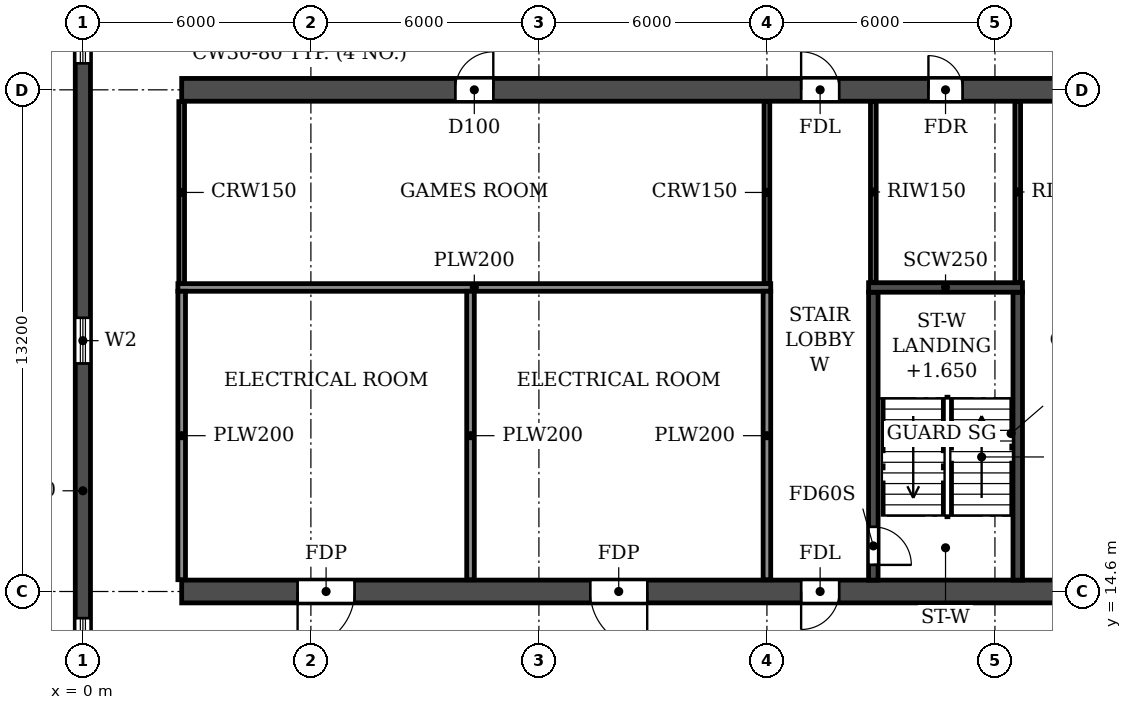
"""IFC4 building model, lengths in metres.
Left out: names, types, materials, properties, quantities, classifications, styles, units other than length and angle.
Written with IfcOpenShell. Run it as: python <this file> out.ifc"""

import sys

from ifc_helpers import new_model, si_unit, direction, frame, frame_2d, origin, place, context, subcontext, project, spatial, rectangle, extrude, element, fill, save


model = new_model("IFC4")
c1 = context("Model", 3, precision=1e-05, world=origin(), true_north=direction((0.0, 1.0)))
c2 = subcontext(c1, "Body", "Model", "MODEL_VIEW")
j1 = project(units=[si_unit("LENGTHUNIT", "METRE"), si_unit("PLANEANGLEUNIT", "RADIAN")], contexts=[c1])
p1 = place(None, origin())
s1 = spatial("IfcSite", under=j1, at=p1, CompositionType="ELEMENT")
p2 = place(p1, origin())
s2 = spatial("IfcBuilding", under=s1, at=p2, CompositionType="ELEMENT")
p3 = place(p2, frame((0.0, 0.0, 43.2)))
s3 = spatial("IfcBuildingStorey", under=s2, at=p3, CompositionType="ELEMENT", Elevation=43.2)
p4 = place(p3, frame((0.0, 4.683, 0.0), z_axis=(0.0, 0.0, 1.0), x_axis=(0.0, 1.0, 0.0)))
e1 = element("IfcWall", 1, at=p4, inside=s3, PredefinedType="SHEAR", context=c2, shape_type="SweptSolid", body=[
    extrude(rectangle(XDim=35.434, YDim=0.4, at=frame_2d((17.717, 0.0))), origin(), (0.0, 0.0, 1.0), 3.05),
])
p5 = place(p4, frame((23.817, 0.0, 0.9)))
e2 = element("IfcOpeningElement", 2, at=p5, cuts=e1, PredefinedType="OPENING", context=c2, shape_type="SweptSolid", body=[
    extrude(rectangle(XDim=1.2, YDim=1.5, at=frame_2d((0.6, 0.75))), frame((0.0, 0.21, 0.0), z_axis=(0.0, -1.0, 0.0), x_axis=(1.0, 0.0, 0.0)), (0.0, 0.0, 1.0), 0.42),
])
p6 = place(p4, frame((8.017, 0.0, 0.9)))
e3 = element("IfcOpeningElement", 3, at=p6, cuts=e1, PredefinedType="OPENING", context=c2, shape_type="SweptSolid", body=[
    extrude(rectangle(XDim=1.2, YDim=1.5, at=frame_2d((0.6, 0.75))), frame((0.0, 0.21, 0.0), z_axis=(0.0, -1.0, 0.0), x_axis=(1.0, 0.0, 0.0)), (0.0, 0.0, 1.0), 0.42),
])
p7 = place(p4, frame((15.917, 0.0, 0.9)))
e4 = element("IfcOpeningElement", 4, at=p7, cuts=e1, PredefinedType="OPENING", context=c2, shape_type="SweptSolid", body=[
    extrude(rectangle(XDim=1.2, YDim=1.5, at=frame_2d((0.6, 0.75))), frame((0.0, 0.21, 0.0), z_axis=(0.0, -1.0, 0.0), x_axis=(1.0, 0.0, 0.0)), (0.0, 0.0, 1.0), 0.42),
])
p8 = place(p4, frame((29.493, 0.0, 0.6)))
e5 = element("IfcOpeningElement", 5, at=p8, cuts=e1, PredefinedType="OPENING", context=c2, shape_type="SweptSolid", body=[
    extrude(rectangle(XDim=2.2, YDim=1.8, at=frame_2d((1.1, 0.9))), frame((0.0, 0.21, 0.0), z_axis=(0.0, -1.0, 0.0), x_axis=(1.0, 0.0, 0.0)), (0.0, 0.0, 1.0), 0.42),
])
p9 = place(p4, frame((2.541, 0.0, 0.6)))
e6 = element("IfcOpeningElement", 6, at=p9, cuts=e1, PredefinedType="OPENING", context=c2, shape_type="SweptSolid", body=[
    extrude(rectangle(XDim=2.2, YDim=1.8, at=frame_2d((1.1, 0.9))), frame((0.0, 0.21, 0.0), z_axis=(0.0, -1.0, 0.0), x_axis=(1.0, 0.0, 0.0)), (0.0, 0.0, 1.0), 0.42),
])
p10 = place(p3, frame((2.6, 14.6, 0.0), z_axis=(0.0, 0.0, 1.0), x_axis=(1.0, 0.0, 0.0)))
e7 = element("IfcWall", 7, at=p10, inside=s3, PredefinedType="SOLIDWALL", context=c2, shape_type="SweptSolid", body=[
    extrude(rectangle(XDim=96.8, YDim=0.6, at=frame_2d((48.4, 0.0))), origin(), (0.0, 0.0, 1.0), 3.05),
])
p11 = place(p10, frame((3.05, 0.0, 0.0)))
e8 = element("IfcOpeningElement", 8, at=p11, cuts=e7, PredefinedType="OPENING", context=c2, shape_type="SweptSolid", body=[
    extrude(rectangle(XDim=1.5, YDim=2.1, at=frame_2d((0.75, 1.05))), frame((0.0, 0.31, 0.0), z_axis=(0.0, -1.0, 0.0), x_axis=(1.0, 0.0, 0.0)), (0.0, 0.0, 1.0), 0.62),
])
p12 = place(p10, frame((10.75, 0.0, 0.0)))
e9 = element("IfcOpeningElement", 9, at=p12, cuts=e7, PredefinedType="OPENING", context=c2, shape_type="SweptSolid", body=[
    extrude(rectangle(XDim=1.5, YDim=2.1, at=frame_2d((0.75, 1.05))), frame((0.0, 0.31, 0.0), z_axis=(0.0, -1.0, 0.0), x_axis=(1.0, 0.0, 0.0)), (0.0, 0.0, 1.0), 0.62),
])
p13 = place(p10, frame((16.3, 0.0, 0.0)))
e10 = element("IfcOpeningElement", 10, at=p13, cuts=e7, PredefinedType="OPENING", context=c2, shape_type="SweptSolid", body=[
    extrude(rectangle(XDim=1.0, YDim=2.1, at=frame_2d((0.5, 1.05))), frame((0.0, 0.31, 0.0), z_axis=(0.0, -1.0, 0.0), x_axis=(1.0, 0.0, 0.0)), (0.0, 0.0, 1.0), 0.62),
])
p14 = place(p10, frame((24.2, 0.0, 0.0)))
e11 = element("IfcOpeningElement", 11, at=p14, cuts=e7, PredefinedType="OPENING", context=c2, shape_type="SweptSolid", body=[
    extrude(rectangle(XDim=1.0, YDim=2.1, at=frame_2d((0.5, 1.05))), frame((0.0, 0.31, 0.0), z_axis=(0.0, -1.0, 0.0), x_axis=(1.0, 0.0, 0.0)), (0.0, 0.0, 1.0), 0.62),
])
p15 = place(p10, frame((28.8, 0.0, 0.0)))
e12 = element("IfcOpeningElement", 12, at=p15, cuts=e7, PredefinedType="OPENING", context=c2, shape_type="SweptSolid", body=[
    extrude(rectangle(XDim=1.0, YDim=2.1, at=frame_2d((0.5, 1.05))), frame((0.0, 0.31, 0.0), z_axis=(0.0, -1.0, 0.0), x_axis=(1.0, 0.0, 0.0)), (0.0, 0.0, 1.0), 0.62),
])
p16 = place(p10, frame((42.7, 0.0, 0.0)))
e13 = element("IfcOpeningElement", 13, at=p16, cuts=e7, PredefinedType="OPENING", context=c2, shape_type="SweptSolid", body=[
    extrude(rectangle(XDim=1.0, YDim=2.1, at=frame_2d((0.5, 1.05))), frame((0.0, 0.31, 0.0), z_axis=(0.0, -1.0, 0.0), x_axis=(1.0, 0.0, 0.0)), (0.0, 0.0, 1.0), 0.62),
])
p17 = place(p10, frame((47.9, 0.0, 0.0)))
e14 = element("IfcOpeningElement", 14, at=p17, cuts=e7, PredefinedType="OPENING", context=c2, shape_type="SweptSolid", body=[
    extrude(rectangle(XDim=1.0, YDim=2.1, at=frame_2d((0.5, 1.05))), frame((0.0, 0.31, 0.0), z_axis=(0.0, -1.0, 0.0), x_axis=(1.0, 0.0, 0.0)), (0.0, 0.0, 1.0), 0.62),
])
p18 = place(p10, frame((51.8, 0.0, 0.0)))
e15 = element("IfcOpeningElement", 15, at=p18, cuts=e7, PredefinedType="OPENING", context=c2, shape_type="SweptSolid", body=[
    extrude(rectangle(XDim=1.0, YDim=2.1, at=frame_2d((0.5, 1.05))), frame((0.0, 0.31, 0.0), z_axis=(0.0, -1.0, 0.0), x_axis=(1.0, 0.0, 0.0)), (0.0, 0.0, 1.0), 0.62),
])
p19 = place(p10, frame((55.7, 0.0, 0.0)))
e16 = element("IfcOpeningElement", 16, at=p19, cuts=e7, PredefinedType="OPENING", context=c2, shape_type="SweptSolid", body=[
    extrude(rectangle(XDim=1.0, YDim=2.1, at=frame_2d((0.5, 1.05))), frame((0.0, 0.31, 0.0), z_axis=(0.0, -1.0, 0.0), x_axis=(1.0, 0.0, 0.0)), (0.0, 0.0, 1.0), 0.62),
])
p20 = place(p10, frame((67.0, 0.0, 0.0)))
e17 = element("IfcOpeningElement", 17, at=p20, cuts=e7, PredefinedType="OPENING", context=c2, shape_type="SweptSolid", body=[
    extrude(rectangle(XDim=1.0, YDim=2.1, at=frame_2d((0.5, 1.05))), frame((0.0, 0.31, 0.0), z_axis=(0.0, -1.0, 0.0), x_axis=(1.0, 0.0, 0.0)), (0.0, 0.0, 1.0), 0.62),
])
p21 = place(p10, frame((71.6, 0.0, 0.0)))
e18 = element("IfcOpeningElement", 18, at=p21, cuts=e7, PredefinedType="OPENING", context=c2, shape_type="SweptSolid", body=[
    extrude(rectangle(XDim=1.0, YDim=2.1, at=frame_2d((0.5, 1.05))), frame((0.0, 0.31, 0.0), z_axis=(0.0, -1.0, 0.0), x_axis=(1.0, 0.0, 0.0)), (0.0, 0.0, 1.0), 0.62),
])
p22 = place(p10, frame((79.5, 0.0, 0.0)))
e19 = element("IfcOpeningElement", 19, at=p22, cuts=e7, PredefinedType="OPENING", context=c2, shape_type="SweptSolid", body=[
    extrude(rectangle(XDim=1.0, YDim=2.1, at=frame_2d((0.5, 1.05))), frame((0.0, 0.31, 0.0), z_axis=(0.0, -1.0, 0.0), x_axis=(1.0, 0.0, 0.0)), (0.0, 0.0, 1.0), 0.62),
])
p23 = place(p10, frame((84.05, 0.0, 0.0)))
e20 = element("IfcOpeningElement", 20, at=p23, cuts=e7, PredefinedType="OPENING", context=c2, shape_type="SweptSolid", body=[
    extrude(rectangle(XDim=1.0, YDim=2.1, at=frame_2d((0.5, 1.05))), frame((0.0, 0.31, 0.0), z_axis=(0.0, -1.0, 0.0), x_axis=(1.0, 0.0, 0.0)), (0.0, 0.0, 1.0), 0.62),
])
p24 = place(p10, frame((91.75, 0.0, 0.0)))
e21 = element("IfcOpeningElement", 21, at=p24, cuts=e7, PredefinedType="OPENING", context=c2, shape_type="SweptSolid", body=[
    extrude(rectangle(XDim=1.0, YDim=2.1, at=frame_2d((0.5, 1.05))), frame((0.0, 0.31, 0.0), z_axis=(0.0, -1.0, 0.0), x_axis=(1.0, 0.0, 0.0)), (0.0, 0.0, 1.0), 0.62),
])
p25 = place(p3, frame((2.6, 27.8, 0.0), z_axis=(0.0, 0.0, 1.0), x_axis=(1.0, 0.0, 0.0)))
e22 = element("IfcWall", 22, at=p25, inside=s3, PredefinedType="SOLIDWALL", context=c2, shape_type="SweptSolid", body=[
    extrude(rectangle(XDim=96.8, YDim=0.6, at=frame_2d((48.4, 0.0))), origin(), (0.0, 0.0, 1.0), 3.05),
])
p26 = place(p25, frame((7.2, 0.0, 0.0)))
e23 = element("IfcOpeningElement", 23, at=p26, cuts=e22, PredefinedType="OPENING", context=c2, shape_type="SweptSolid", body=[
    extrude(rectangle(XDim=1.0, YDim=2.1, at=frame_2d((0.5, 1.05))), frame((0.0, 0.31, 0.0), z_axis=(0.0, -1.0, 0.0), x_axis=(1.0, 0.0, 0.0)), (0.0, 0.0, 1.0), 0.62),
])
p27 = place(p25, frame((16.3, 0.0, 0.0)))
e24 = element("IfcOpeningElement", 24, at=p27, cuts=e22, PredefinedType="OPENING", context=c2, shape_type="SweptSolid", body=[
    extrude(rectangle(XDim=1.0, YDim=2.1, at=frame_2d((0.5, 1.05))), frame((0.0, 0.31, 0.0), z_axis=(0.0, -1.0, 0.0), x_axis=(1.0, 0.0, 0.0)), (0.0, 0.0, 1.0), 0.62),
])
p28 = place(p25, frame((19.65, 0.0, 0.0)))
e25 = element("IfcOpeningElement", 25, at=p28, cuts=e22, PredefinedType="OPENING", context=c2, shape_type="SweptSolid", body=[
    extrude(rectangle(XDim=0.9, YDim=2.1, at=frame_2d((0.45, 1.05))), frame((0.0, 0.31, 0.0), z_axis=(0.0, -1.0, 0.0), x_axis=(1.0, 0.0, 0.0)), (0.0, 0.0, 1.0), 0.62),
])
p29 = place(p25, frame((28.85, 0.0, 0.0)))
e26 = element("IfcOpeningElement", 26, at=p29, cuts=e22, PredefinedType="OPENING", context=c2, shape_type="SweptSolid", body=[
    extrude(rectangle(XDim=0.9, YDim=2.1, at=frame_2d((0.45, 1.05))), frame((0.0, 0.31, 0.0), z_axis=(0.0, -1.0, 0.0), x_axis=(1.0, 0.0, 0.0)), (0.0, 0.0, 1.0), 0.62),
])
p30 = place(p25, frame((33.3, 0.0, 0.0)))
e27 = element("IfcOpeningElement", 27, at=p30, cuts=e22, PredefinedType="OPENING", context=c2, shape_type="SweptSolid", body=[
    extrude(rectangle(XDim=1.0, YDim=2.1, at=frame_2d((0.5, 1.05))), frame((0.0, 0.31, 0.0), z_axis=(0.0, -1.0, 0.0), x_axis=(1.0, 0.0, 0.0)), (0.0, 0.0, 1.0), 0.62),
])
p31 = place(p25, frame((38.25, 0.0, 0.0)))
e28 = element("IfcOpeningElement", 28, at=p31, cuts=e22, PredefinedType="OPENING", context=c2, shape_type="SweptSolid", body=[
    extrude(rectangle(XDim=1.5, YDim=2.1, at=frame_2d((0.75, 1.05))), frame((0.0, 0.31, 0.0), z_axis=(0.0, -1.0, 0.0), x_axis=(1.0, 0.0, 0.0)), (0.0, 0.0, 1.0), 0.62),
])
p32 = place(p25, frame((45.0, 0.0, 0.0)))
e29 = element("IfcOpeningElement", 29, at=p32, cuts=e22, PredefinedType="OPENING", context=c2, shape_type="SweptSolid", body=[
    extrude(rectangle(XDim=1.0, YDim=2.1, at=frame_2d((0.5, 1.05))), frame((0.0, 0.31, 0.0), z_axis=(0.0, -1.0, 0.0), x_axis=(1.0, 0.0, 0.0)), (0.0, 0.0, 1.0), 0.62),
])
p33 = place(p25, frame((47.9, 0.0, 0.0)))
e30 = element("IfcOpeningElement", 30, at=p33, cuts=e22, PredefinedType="OPENING", context=c2, shape_type="SweptSolid", body=[
    extrude(rectangle(XDim=1.0, YDim=2.1, at=frame_2d((0.5, 1.05))), frame((0.0, 0.31, 0.0), z_axis=(0.0, -1.0, 0.0), x_axis=(1.0, 0.0, 0.0)), (0.0, 0.0, 1.0), 0.62),
])
p34 = place(p25, frame((52.1, 0.0, 0.0)))
e31 = element("IfcOpeningElement", 31, at=p34, cuts=e22, PredefinedType="OPENING", context=c2, shape_type="SweptSolid", body=[
    extrude(rectangle(XDim=1.0, YDim=2.1, at=frame_2d((0.5, 1.05))), frame((0.0, 0.31, 0.0), z_axis=(0.0, -1.0, 0.0), x_axis=(1.0, 0.0, 0.0)), (0.0, 0.0, 1.0), 0.62),
])
p35 = place(p25, frame((56.0, 0.0, 0.0)))
e32 = element("IfcOpeningElement", 32, at=p35, cuts=e22, PredefinedType="OPENING", context=c2, shape_type="SweptSolid", body=[
    extrude(rectangle(XDim=1.0, YDim=2.1, at=frame_2d((0.5, 1.05))), frame((0.0, 0.31, 0.0), z_axis=(0.0, -1.0, 0.0), x_axis=(1.0, 0.0, 0.0)), (0.0, 0.0, 1.0), 0.62),
])
p36 = place(p25, frame((61.2, 0.0, 0.0)))
e33 = element("IfcOpeningElement", 33, at=p36, cuts=e22, PredefinedType="OPENING", context=c2, shape_type="SweptSolid", body=[
    extrude(rectangle(XDim=1.0, YDim=2.1, at=frame_2d((0.5, 1.05))), frame((0.0, 0.31, 0.0), z_axis=(0.0, -1.0, 0.0), x_axis=(1.0, 0.0, 0.0)), (0.0, 0.0, 1.0), 0.62),
])
p37 = place(p25, frame((67.05, 0.0, 0.0)))
e34 = element("IfcOpeningElement", 34, at=p37, cuts=e22, PredefinedType="OPENING", context=c2, shape_type="SweptSolid", body=[
    extrude(rectangle(XDim=0.9, YDim=2.1, at=frame_2d((0.45, 1.05))), frame((0.0, 0.31, 0.0), z_axis=(0.0, -1.0, 0.0), x_axis=(1.0, 0.0, 0.0)), (0.0, 0.0, 1.0), 0.62),
])
p38 = place(p25, frame((76.25, 0.0, 0.0)))
e35 = element("IfcOpeningElement", 35, at=p38, cuts=e22, PredefinedType="OPENING", context=c2, shape_type="SweptSolid", body=[
    extrude(rectangle(XDim=0.9, YDim=2.1, at=frame_2d((0.45, 1.05))), frame((0.0, 0.31, 0.0), z_axis=(0.0, -1.0, 0.0), x_axis=(1.0, 0.0, 0.0)), (0.0, 0.0, 1.0), 0.62),
])
p39 = place(p25, frame((79.5, 0.0, 0.0)))
e36 = element("IfcOpeningElement", 36, at=p39, cuts=e22, PredefinedType="OPENING", context=c2, shape_type="SweptSolid", body=[
    extrude(rectangle(XDim=1.0, YDim=2.1, at=frame_2d((0.5, 1.05))), frame((0.0, 0.31, 0.0), z_axis=(0.0, -1.0, 0.0), x_axis=(1.0, 0.0, 0.0)), (0.0, 0.0, 1.0), 0.62),
])
p40 = place(p25, frame((84.05, 0.0, 0.0)))
e37 = element("IfcOpeningElement", 37, at=p40, cuts=e22, PredefinedType="OPENING", context=c2, shape_type="SweptSolid", body=[
    extrude(rectangle(XDim=1.0, YDim=2.1, at=frame_2d((0.5, 1.05))), frame((0.0, 0.31, 0.0), z_axis=(0.0, -1.0, 0.0), x_axis=(1.0, 0.0, 0.0)), (0.0, 0.0, 1.0), 0.62),
])
p41 = place(p25, frame((91.75, 0.0, 0.0)))
e38 = element("IfcOpeningElement", 38, at=p41, cuts=e22, PredefinedType="OPENING", context=c2, shape_type="SweptSolid", body=[
    extrude(rectangle(XDim=1.0, YDim=2.1, at=frame_2d((0.5, 1.05))), frame((0.0, 0.31, 0.0), z_axis=(0.0, -1.0, 0.0), x_axis=(1.0, 0.0, 0.0)), (0.0, 0.0, 1.0), 0.62),
])
p42 = place(p3, frame((20.8, 14.9, 0.0), z_axis=(0.0, 0.0, 1.0), x_axis=(0.0, 1.0, 0.0)))
e39 = element("IfcWall", 39, at=p42, inside=s3, PredefinedType="SOLIDWALL", context=c2, shape_type="SweptSolid", body=[
    extrude(rectangle(XDim=7.575, YDim=0.25, at=frame_2d((3.788, 0.0))), origin(), (0.0, 0.0, 1.0), 3.05),
])
p43 = place(p42, frame((0.4, 0.0, 0.0)))
e40 = element("IfcOpeningElement", 40, at=p43, cuts=e39, PredefinedType="OPENING", context=c2, shape_type="SweptSolid", body=[
    extrude(rectangle(XDim=1.0, YDim=2.1, at=frame_2d((0.5, 1.05))), frame((0.0, 0.135, 0.0), z_axis=(0.0, -1.0, 0.0), x_axis=(1.0, 0.0, 0.0)), (0.0, 0.0, 1.0), 0.27),
])
p44 = place(p3, frame((24.6, 14.9, 0.0), z_axis=(0.0, 0.0, 1.0), x_axis=(0.0, 1.0, 0.0)))
e41 = element("IfcWall", 41, at=p44, inside=s3, PredefinedType="SOLIDWALL", context=c2, shape_type="SweptSolid", body=[
    extrude(rectangle(XDim=7.575, YDim=0.25, at=frame_2d((3.788, 0.0))), origin(), (0.0, 0.0, 1.0), 3.05),
])
p45 = place(p3, frame((20.675, 22.6, 0.0), z_axis=(0.0, 0.0, 1.0), x_axis=(1.0, 0.0, 0.0)))
e42 = element("IfcWall", 42, at=p45, inside=s3, PredefinedType="SOLIDWALL", context=c2, shape_type="SweptSolid", body=[
    extrude(rectangle(XDim=4.05, YDim=0.25, at=frame_2d((2.025, 0.0))), origin(), (0.0, 0.0, 1.0), 3.05),
])
for number, where, z_axis, x_axis in (
    (43, (2.6, 22.7, 0.0), (0.0, 0.0, 1.0), (0.0, 1.0, 0.0)),
    (44, (18.0, 22.7, 0.0), (0.0, 0.0, 1.0), (0.0, 1.0, 0.0)),
):
    element("IfcWall", number, at=place(p3, frame(where, z_axis=z_axis, x_axis=x_axis)), inside=s3, PredefinedType="PARTITIONING", context=c2, shape_type="SweptSolid", body=[
        extrude(rectangle(XDim=4.79, YDim=0.15, at=frame_2d((2.395, 0.0))), origin(), (0.0, 0.0, 1.0), 3.05),
    ])
p46 = place(p3, frame((2.5, 22.6, 0.0), z_axis=(0.0, 0.0, 1.0), x_axis=(1.0, 0.0, 0.0)))
e45 = element("IfcWall", 45, at=p46, inside=s3, PredefinedType="PARTITIONING", context=c2, shape_type="SweptSolid", body=[
    extrude(rectangle(XDim=15.6, YDim=0.2, at=frame_2d((7.8, 0.0))), origin(), (0.0, 0.0, 1.0), 3.05),
])
for number, where, z_axis, x_axis in (
    (46, (2.6, 14.91, 0.0), (0.0, 0.0, 1.0), (0.0, 1.0, 0.0)),
    (47, (10.2, 14.91, 0.0), (0.0, 0.0, 1.0), (0.0, 1.0, 0.0)),
    (48, (18.0, 14.91, 0.0), (0.0, 0.0, 1.0), (0.0, 1.0, 0.0)),
):
    element("IfcWall", number, at=place(p3, frame(where, z_axis=z_axis, x_axis=x_axis)), inside=s3, PredefinedType="PARTITIONING", context=c2, shape_type="SweptSolid", body=[
        extrude(rectangle(XDim=7.59, YDim=0.2, at=frame_2d((3.795, 0.0))), origin(), (0.0, 0.0, 1.0), 3.05),
    ])
for number, where, z_axis, x_axis in (
    (49, (20.8, 22.735, 0.0), (0.0, 0.0, 1.0), (0.0, 1.0, 0.0)),
    (50, (24.6, 22.735, 0.0), (0.0, 0.0, 1.0), (0.0, 1.0, 0.0)),
):
    element("IfcWall", number, at=place(p3, frame(where, z_axis=z_axis, x_axis=x_axis)), inside=s3, PredefinedType="PARTITIONING", context=c2, shape_type="SweptSolid", body=[
        extrude(rectangle(XDim=4.755, YDim=0.15, at=frame_2d((2.377, 0.0))), origin(), (0.0, 0.0, 1.0), 3.05),
    ])
p47 = place(p5, origin())
e51 = element("IfcWindow", 51, at=p47, inside=s3, PartitioningType="SINGLE_PANEL", PredefinedType="WINDOW", context=c2, shape_type="SweptSolid", body=[
    extrude(rectangle(XDim=1.2, YDim=1.5, at=frame_2d((0.6, 0.75))), frame((0.0, 0.03, 0.0), z_axis=(0.0, -1.0, 0.0), x_axis=(1.0, 0.0, 0.0)), (0.0, 0.0, 1.0), 0.06),
])
fill(e2, e51)
p48 = place(p6, origin())
e52 = element("IfcWindow", 52, at=p48, inside=s3, PartitioningType="SINGLE_PANEL", PredefinedType="WINDOW", context=c2, shape_type="SweptSolid", body=[
    extrude(rectangle(XDim=1.2, YDim=1.5, at=frame_2d((0.6, 0.75))), frame((0.0, 0.03, 0.0), z_axis=(0.0, -1.0, 0.0), x_axis=(1.0, 0.0, 0.0)), (0.0, 0.0, 1.0), 0.06),
])
fill(e3, e52)
p49 = place(p7, origin())
e53 = element("IfcWindow", 53, at=p49, inside=s3, PartitioningType="SINGLE_PANEL", PredefinedType="WINDOW", context=c2, shape_type="SweptSolid", body=[
    extrude(rectangle(XDim=1.2, YDim=1.5, at=frame_2d((0.6, 0.75))), frame((0.0, 0.03, 0.0), z_axis=(0.0, -1.0, 0.0), x_axis=(1.0, 0.0, 0.0)), (0.0, 0.0, 1.0), 0.06),
])
fill(e4, e53)
p50 = place(p26, origin())
e54 = element("IfcDoor", 54, at=p50, inside=s3, OperationType="SINGLE_SWING_RIGHT", PredefinedType="DOOR", context=c2, shape_type="SweptSolid", body=[
    extrude(rectangle(XDim=1.0, YDim=2.1, at=frame_2d((0.5, 1.05))), frame((0.0, 0.025, 0.0), z_axis=(0.0, -1.0, 0.0), x_axis=(1.0, 0.0, 0.0)), (0.0, 0.0, 1.0), 0.05),
])
fill(e23, e54)
p51 = place(p27, origin())
e55 = element("IfcDoor", 55, at=p51, inside=s3, OperationType="SINGLE_SWING_LEFT", PredefinedType="DOOR", context=c2, shape_type="SweptSolid", body=[
    extrude(rectangle(XDim=1.0, YDim=2.1, at=frame_2d((0.5, 1.05))), frame((0.0, 0.025, 0.0), z_axis=(0.0, -1.0, 0.0), x_axis=(1.0, 0.0, 0.0)), (0.0, 0.0, 1.0), 0.05),
])
fill(e24, e55)
p52 = place(p28, origin())
e56 = element("IfcDoor", 56, at=p52, inside=s3, OperationType="SINGLE_SWING_LEFT", PredefinedType="DOOR", context=c2, shape_type="SweptSolid", body=[
    extrude(rectangle(XDim=0.9, YDim=2.1, at=frame_2d((0.45, 1.05))), frame((0.0, 0.025, 0.0), z_axis=(0.0, -1.0, 0.0), x_axis=(1.0, 0.0, 0.0)), (0.0, 0.0, 1.0), 0.05),
])
fill(e25, e56)
p53 = place(p11, frame((1.5, 0.0, 0.0), z_axis=(0.0, 0.0, 1.0), x_axis=(-1.0, 0.0, 0.0)))
e57 = element("IfcDoor", 57, at=p53, inside=s3, OperationType="DOUBLE_DOOR_SINGLE_SWING", PredefinedType="DOOR", context=c2, shape_type="SweptSolid", body=[
    extrude(rectangle(XDim=1.5, YDim=2.1, at=frame_2d((0.75, 1.05))), frame((0.0, 0.025, 0.0), z_axis=(0.0, -1.0, 0.0), x_axis=(1.0, 0.0, 0.0)), (0.0, 0.0, 1.0), 0.05),
])
fill(e8, e57)
p54 = place(p12, frame((1.5, 0.0, 0.0), z_axis=(0.0, 0.0, 1.0), x_axis=(-1.0, 0.0, 0.0)))
e58 = element("IfcDoor", 58, at=p54, inside=s3, OperationType="DOUBLE_DOOR_SINGLE_SWING", PredefinedType="DOOR", context=c2, shape_type="SweptSolid", body=[
    extrude(rectangle(XDim=1.5, YDim=2.1, at=frame_2d((0.75, 1.05))), frame((0.0, 0.025, 0.0), z_axis=(0.0, -1.0, 0.0), x_axis=(1.0, 0.0, 0.0)), (0.0, 0.0, 1.0), 0.05),
])
fill(e9, e58)
p55 = place(p13, frame((1.0, 0.0, 0.0), z_axis=(0.0, 0.0, 1.0), x_axis=(-1.0, 0.0, 0.0)))
e59 = element("IfcDoor", 59, at=p55, inside=s3, OperationType="SINGLE_SWING_RIGHT", PredefinedType="DOOR", context=c2, shape_type="SweptSolid", body=[
    extrude(rectangle(XDim=1.0, YDim=2.1, at=frame_2d((0.5, 1.05))), frame((0.0, 0.025, 0.0), z_axis=(0.0, -1.0, 0.0), x_axis=(1.0, 0.0, 0.0)), (0.0, 0.0, 1.0), 0.05),
])
fill(e10, e59)
p56 = place(p43, frame((1.0, 0.0, 0.0), z_axis=(0.0, 0.0, 1.0), x_axis=(-1.0, 0.0, 0.0)))
e60 = element("IfcDoor", 60, at=p56, inside=s3, OperationType="SINGLE_SWING_RIGHT", PredefinedType="DOOR", context=c2, shape_type="SweptSolid", body=[
    extrude(rectangle(XDim=1.0, YDim=2.1, at=frame_2d((0.5, 1.05))), frame((0.0, 0.025, 0.0), z_axis=(0.0, -1.0, 0.0), x_axis=(1.0, 0.0, 0.0)), (0.0, 0.0, 1.0), 0.05),
])
fill(e40, e60)
save(model, sys.argv[1])
